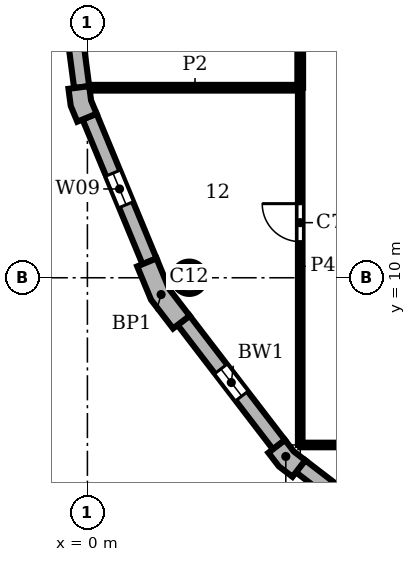
"""IFC4 building model, lengths in metres.
Left out: names, types, materials, properties, quantities, classifications, styles, units other than length and angle.
Written with IfcOpenShell. Run it as: python <this file> out.ifc"""

import sys

from ifc_helpers import new_model, si_unit, direction, frame, frame_2d, origin, origin_2d, place, context, subcontext, project, spatial, polyline, rectangle, circle, outline, extrude, element, fill, save


model = new_model("IFC4")
c1 = context("Model", 3, precision=1e-05, world=origin(), true_north=direction((0.0, 1.0)))
c2 = subcontext(c1, "Body", "Model", "MODEL_VIEW")
j1 = project(units=[si_unit("LENGTHUNIT", "METRE"), si_unit("PLANEANGLEUNIT", "RADIAN")], contexts=[c1])
p1 = place(None, origin())
s1 = spatial("IfcSite", under=j1, at=p1, CompositionType="ELEMENT")
p2 = place(p1, origin())
s2 = spatial("IfcBuilding", under=s1, at=p2, CompositionType="ELEMENT")
p3 = place(p2, frame((0.0, 0.0, 306.0)))
s3 = spatial("IfcBuildingStorey", under=s2, at=p3, CompositionType="ELEMENT", Elevation=306.0)
p4 = place(p3, frame((2.679, 10.0, 0.0), z_axis=(0.0, 0.0, 1.0), x_axis=(1.0, 0.0, 0.0)))
e1 = element("IfcColumn", 1, at=p4, inside=s3, PredefinedType="COLUMN", context=c2, shape_type="SweptSolid", body=[
    extrude(circle(Radius=0.425, at=origin_2d()), origin(), (0.0, 0.0, 1.0), 3.9),
])
p5 = place(p3, origin())
e2 = element("IfcWall", 2, at=p5, inside=s3, PredefinedType="SOLIDWALL", context=c2, shape_type="SweptSolid", body=[
    extrude(outline(polyline([(-0.349, 14.99), (-0.498, 14.971), (-0.439, 14.523), (-0.266, 14.106), (-0.128, 14.164), (0.242, 14.317), (0.097, 14.667), (0.047, 15.043), (-0.349, 14.99)])), origin(), (0.0, 0.0, 1.0), 3.9),
])
e3 = element("IfcWall", 3, at=p5, inside=s3, PredefinedType="SOLIDWALL", context=c2, shape_type="SweptSolid", body=[
    extrude(outline(polyline([(1.449, 10.356), (1.311, 10.299), (1.675, 9.42), (2.254, 8.665), (2.373, 8.757), (2.69, 9.0), (2.155, 9.698), (1.819, 10.51), (1.449, 10.356)])), origin(), (0.0, 0.0, 1.0), 3.9),
])
e4 = element("IfcWall", 4, at=p5, inside=s3, PredefinedType="SOLIDWALL", context=c2, shape_type="SweptSolid", body=[
    extrude(outline(polyline([(4.882, 5.487), (4.763, 5.396), (5.038, 5.038), (5.396, 4.763), (5.487, 4.882), (5.731, 5.199), (5.43, 5.43), (5.199, 5.731), (4.882, 5.487)])), origin(), (0.0, 0.0, 1.0), 3.9),
])
p6 = place(p3, frame((-0.689, 19.102, 0.0), z_axis=(0.0, 0.0, 1.0), x_axis=(0.130514280502, -0.991446429508, 0.0)))
e5 = element("IfcWall", 5, at=p6, inside=s3, PredefinedType="SOLIDWALL", context=c2, shape_type="SweptSolid", body=[
    extrude(rectangle(XDim=4.121, YDim=0.4, at=frame_2d((2.061, 0.0))), origin(), (0.0, 0.0, 1.0), 3.9),
])
p7 = place(p6, frame((1.611, 0.0, 0.9)))
e6 = element("IfcOpeningElement", 6, at=p7, cuts=e5, PredefinedType="OPENING", context=c2, shape_type="SweptSolid", body=[
    extrude(rectangle(XDim=0.9, YDim=2.35, at=frame_2d((0.45, 1.175))), frame((0.0, 0.21, 0.0), z_axis=(0.0, -1.0, 0.0), x_axis=(1.0, 0.0, 0.0)), (0.0, 0.0, 1.0), 0.42),
])
p8 = place(p3, frame((0.057, 14.24, 0.0), z_axis=(0.0, 0.0, 1.0), x_axis=(0.382721546029, -0.923863744394, 0.0)))
e7 = element("IfcWall", 7, at=p8, inside=s3, PredefinedType="SOLIDWALL", context=c2, shape_type="SweptSolid", body=[
    extrude(rectangle(XDim=4.121, YDim=0.4, at=frame_2d((2.061, 0.0))), origin(), (0.0, 0.0, 1.0), 3.9),
])
p9 = place(p8, frame((1.611, 0.0, 0.9)))
e8 = element("IfcOpeningElement", 8, at=p9, cuts=e7, PredefinedType="OPENING", context=c2, shape_type="SweptSolid", body=[
    extrude(rectangle(XDim=0.9, YDim=2.35, at=frame_2d((0.45, 1.175))), frame((0.0, 0.21, 0.0), z_axis=(0.0, -1.0, 0.0), x_axis=(1.0, 0.0, 0.0)), (0.0, 0.0, 1.0), 0.42),
])
p10 = place(p3, frame((2.532, 8.878, 0.0), z_axis=(0.0, 0.0, 1.0), x_axis=(0.608759824817, -0.793354571229, 0.0)))
e9 = element("IfcWall", 9, at=p10, inside=s3, PredefinedType="SOLIDWALL", context=c2, shape_type="SweptSolid", body=[
    extrude(rectangle(XDim=4.121, YDim=0.4, at=frame_2d((2.061, 0.0))), origin(), (0.0, 0.0, 1.0), 3.9),
])
p11 = place(p10, frame((1.611, 0.0, 0.9)))
e10 = element("IfcOpeningElement", 10, at=p11, cuts=e9, PredefinedType="OPENING", context=c2, shape_type="SweptSolid", body=[
    extrude(rectangle(XDim=0.9, YDim=2.35, at=frame_2d((0.45, 1.175))), frame((0.0, 0.21, 0.0), z_axis=(0.0, -1.0, 0.0), x_axis=(1.0, 0.0, 0.0)), (0.0, 0.0, 1.0), 0.42),
])
p12 = place(p3, frame((5.609, 5.041, 0.0), z_axis=(0.0, 0.0, 1.0), x_axis=(0.793354571229, -0.608759824817, 0.0)))
e11 = element("IfcWall", 11, at=p12, inside=s3, PredefinedType="SOLIDWALL", context=c2, shape_type="SweptSolid", body=[
    extrude(rectangle(XDim=4.121, YDim=0.4, at=frame_2d((2.061, 0.0))), origin(), (0.0, 0.0, 1.0), 3.9),
])
p13 = place(p12, frame((1.611, 0.0, 0.9)))
e12 = element("IfcOpeningElement", 12, at=p13, cuts=e11, PredefinedType="OPENING", context=c2, shape_type="SweptSolid", body=[
    extrude(rectangle(XDim=0.9, YDim=2.35, at=frame_2d((0.45, 1.175))), frame((0.0, 0.21, 0.0), z_axis=(0.0, -1.0, 0.0), x_axis=(1.0, 0.0, 0.0)), (0.0, 0.0, 1.0), 0.42),
])
p14 = place(p3, frame((5.6, 15.0, 0.0), z_axis=(0.0, 0.0, 1.0), x_axis=(0.0, 1.0, 0.0)))
e13 = element("IfcWall", 13, at=p14, inside=s3, PredefinedType="PARTITIONING", context=c2, shape_type="SweptSolid", body=[
    extrude(rectangle(XDim=5.0, YDim=0.15, at=frame_2d((2.5, 0.0))), origin(), (0.0, 0.0, 1.0), 3.58),
])
p15 = place(p14, frame((1.85, 0.0, 0.0)))
e14 = element("IfcOpeningElement", 14, at=p15, cuts=e13, PredefinedType="OPENING", context=c2, shape_type="SweptSolid", body=[
    extrude(rectangle(XDim=0.8, YDim=2.1, at=frame_2d((0.4, 1.05))), frame((0.0, 0.085, 0.0), z_axis=(0.0, -1.0, 0.0), x_axis=(1.0, 0.0, 0.0)), (0.0, 0.0, 1.0), 0.17),
])
p16 = place(p3, frame((0.063, 15.0, 0.0), z_axis=(0.0, 0.0, 1.0), x_axis=(1.0, 0.0, 0.0)))
e15 = element("IfcWall", 15, at=p16, inside=s3, PredefinedType="PARTITIONING", context=c2, shape_type="SweptSolid", body=[
    extrude(rectangle(XDim=5.537, YDim=0.15, at=frame_2d((2.769, 0.0))), origin(), (0.0, 0.0, 1.0), 3.58),
])
p17 = place(p3, frame((5.6, 5.6, 0.0), z_axis=(0.0, 0.0, 1.0), x_axis=(0.0, 1.0, 0.0)))
e16 = element("IfcWall", 16, at=p17, inside=s3, PredefinedType="PARTITIONING", context=c2, shape_type="SweptSolid", body=[
    extrude(rectangle(XDim=9.4, YDim=0.12, at=frame_2d((4.7, 0.0))), origin(), (0.0, 0.0, 1.0), 3.58),
])
p18 = place(p17, frame((5.35, 0.0, 0.0)))
e17 = element("IfcOpeningElement", 17, at=p18, cuts=e16, PredefinedType="OPENING", context=c2, shape_type="SweptSolid", body=[
    extrude(rectangle(XDim=1.0, YDim=2.1, at=frame_2d((0.5, 1.05))), frame((0.0, 0.07, 0.0), z_axis=(0.0, -1.0, 0.0), x_axis=(1.0, 0.0, 0.0)), (0.0, 0.0, 1.0), 0.14),
])
p19 = place(p3, frame((5.6, 5.6, 0.0), z_axis=(0.0, 0.0, 1.0), x_axis=(1.0, 0.0, 0.0)))
e18 = element("IfcWall", 18, at=p19, inside=s3, PredefinedType="PARTITIONING", context=c2, shape_type="SweptSolid", body=[
    extrude(rectangle(XDim=9.4, YDim=0.12, at=frame_2d((4.7, 0.0))), origin(), (0.0, 0.0, 1.0), 3.58),
])
p20 = place(p19, frame((4.6, 0.0, 0.0)))
e19 = element("IfcOpeningElement", 19, at=p20, cuts=e18, PredefinedType="OPENING", context=c2, shape_type="SweptSolid", body=[
    extrude(rectangle(XDim=1.0, YDim=2.1, at=frame_2d((0.5, 1.05))), frame((0.0, 0.07, 0.0), z_axis=(0.0, -1.0, 0.0), x_axis=(1.0, 0.0, 0.0)), (0.0, 0.0, 1.0), 0.14),
])
p21 = place(p9, origin())
e20 = element("IfcWindow", 20, at=p21, inside=s3, PartitioningType="SINGLE_PANEL", PredefinedType="WINDOW", context=c2, shape_type="SweptSolid", body=[
    extrude(rectangle(XDim=0.9, YDim=2.35, at=frame_2d((0.45, 1.175))), frame((0.0, 0.16, 0.0), z_axis=(0.0, -1.0, 0.0), x_axis=(1.0, 0.0, 0.0)), (0.0, 0.0, 1.0), 0.06),
])
fill(e8, e20)
p22 = place(p11, origin())
e21 = element("IfcWindow", 21, at=p22, inside=s3, PartitioningType="SINGLE_PANEL", PredefinedType="WINDOW", context=c2, shape_type="SweptSolid", body=[
    extrude(rectangle(XDim=0.9, YDim=2.35, at=frame_2d((0.45, 1.175))), frame((0.0, 0.16, 0.0), z_axis=(0.0, -1.0, 0.0), x_axis=(1.0, 0.0, 0.0)), (0.0, 0.0, 1.0), 0.06),
])
fill(e10, e21)
p23 = place(p18, origin())
e22 = element("IfcDoor", 22, at=p23, inside=s3, OperationType="SINGLE_SWING_RIGHT", PredefinedType="DOOR", context=c2, shape_type="SweptSolid", body=[
    extrude(rectangle(XDim=1.0, YDim=2.1, at=frame_2d((0.5, 1.05))), frame((0.0, 0.025, 0.0), z_axis=(0.0, -1.0, 0.0), x_axis=(1.0, 0.0, 0.0)), (0.0, 0.0, 1.0), 0.05),
])
fill(e17, e22)
save(model, sys.argv[1])
